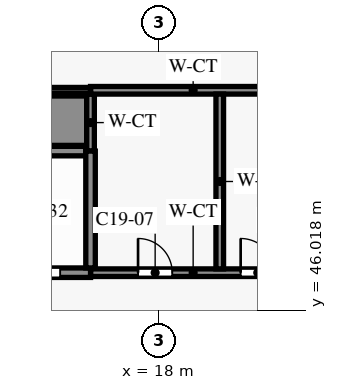
"""IFC4 building model, lengths in metres.
Left out: names, types, materials, properties, quantities, classifications, styles, units other than length and angle.
Written with IfcOpenShell. Run it as: python <this file> out.ifc"""

import sys

from ifc_helpers import new_model, si_unit, direction, frame, frame_2d, origin, place, context, subcontext, project, spatial, rectangle, extrude, element, fill, save


model = new_model("IFC4")
c1 = context("Model", 3, precision=1e-05, world=origin(), true_north=direction((0.0, 1.0)))
c2 = subcontext(c1, "Body", "Model", "MODEL_VIEW")
j1 = project(units=[si_unit("LENGTHUNIT", "METRE"), si_unit("PLANEANGLEUNIT", "RADIAN")], contexts=[c1])
p1 = place(None, origin())
s1 = spatial("IfcSite", under=j1, at=p1, CompositionType="ELEMENT")
p2 = place(p1, origin())
s2 = spatial("IfcBuilding", under=s1, at=p2, CompositionType="ELEMENT")
p3 = place(p2, frame((0.0, 0.0, 137.9)))
s3 = spatial("IfcBuildingStorey", under=s2, at=p3, CompositionType="ELEMENT", Elevation=137.9)
p4 = place(p3, frame((16.2, 47.0, 0.0), z_axis=(0.0, 0.0, 1.0), x_axis=(1.0, 0.0, 0.0)))
e1 = element("IfcWall", 1, at=p4, inside=s3, PredefinedType="PARTITIONING", context=c2, shape_type="SweptSolid", body=[
    extrude(rectangle(XDim=5.4, YDim=0.2, at=frame_2d((2.7, 0.0))), origin(), (0.0, 0.0, 1.0), 5.2),
])
p5 = place(p4, frame((1.25, 0.0, 0.0)))
e2 = element("IfcOpeningElement", 2, at=p5, cuts=e1, PredefinedType="OPENING", context=c2, shape_type="SweptSolid", body=[
    extrude(rectangle(XDim=0.9, YDim=2.1, at=frame_2d((0.45, 1.05))), frame((0.0, 0.11, 0.0), z_axis=(0.0, -1.0, 0.0), x_axis=(1.0, 0.0, 0.0)), (0.0, 0.0, 1.0), 0.22),
])
p6 = place(p4, frame((3.95, 0.0, 0.0)))
e3 = element("IfcOpeningElement", 3, at=p6, cuts=e1, PredefinedType="OPENING", context=c2, shape_type="SweptSolid", body=[
    extrude(rectangle(XDim=0.9, YDim=2.1, at=frame_2d((0.45, 1.05))), frame((0.0, 0.11, 0.0), z_axis=(0.0, -1.0, 0.0), x_axis=(1.0, 0.0, 0.0)), (0.0, 0.0, 1.0), 0.22),
])
p7 = place(p3, frame((0.125, 47.0, 0.0), z_axis=(0.0, 0.0, 1.0), x_axis=(1.0, 0.0, 0.0)))
e4 = element("IfcWall", 4, at=p7, inside=s3, PredefinedType="SHEAR", context=c2, shape_type="SweptSolid", body=[
    extrude(rectangle(XDim=16.075, YDim=0.25, at=frame_2d((8.038, 0.0))), origin(), (0.0, 0.0, 1.0), 5.2),
])
p8 = place(p7, frame((0.675, 0.0, 0.0)))
e5 = element("IfcOpeningElement", 5, at=p8, cuts=e4, PredefinedType="OPENING", context=c2, shape_type="SweptSolid", body=[
    extrude(rectangle(XDim=1.1, YDim=2.1, at=frame_2d((0.55, 1.05))), frame((0.0, 0.135, 0.0), z_axis=(0.0, -1.0, 0.0), x_axis=(1.0, 0.0, 0.0)), (0.0, 0.0, 1.0), 0.27),
])
p9 = place(p7, frame((3.375, 0.0, 0.0)))
e6 = element("IfcOpeningElement", 6, at=p9, cuts=e4, PredefinedType="OPENING", context=c2, shape_type="SweptSolid", body=[
    extrude(rectangle(XDim=1.1, YDim=2.1, at=frame_2d((0.55, 1.05))), frame((0.0, 0.135, 0.0), z_axis=(0.0, -1.0, 0.0), x_axis=(1.0, 0.0, 0.0)), (0.0, 0.0, 1.0), 0.27),
])
p10 = place(p7, frame((6.075, 0.0, 0.0)))
e7 = element("IfcOpeningElement", 7, at=p10, cuts=e4, PredefinedType="OPENING", context=c2, shape_type="SweptSolid", body=[
    extrude(rectangle(XDim=1.1, YDim=2.1, at=frame_2d((0.55, 1.05))), frame((0.0, 0.135, 0.0), z_axis=(0.0, -1.0, 0.0), x_axis=(1.0, 0.0, 0.0)), (0.0, 0.0, 1.0), 0.27),
])
p11 = place(p7, frame((8.775, 0.0, 0.0)))
e8 = element("IfcOpeningElement", 8, at=p11, cuts=e4, PredefinedType="OPENING", context=c2, shape_type="SweptSolid", body=[
    extrude(rectangle(XDim=1.1, YDim=2.1, at=frame_2d((0.55, 1.05))), frame((0.0, 0.135, 0.0), z_axis=(0.0, -1.0, 0.0), x_axis=(1.0, 0.0, 0.0)), (0.0, 0.0, 1.0), 0.27),
])
p12 = place(p7, frame((11.475, 0.0, 0.0)))
e9 = element("IfcOpeningElement", 9, at=p12, cuts=e4, PredefinedType="OPENING", context=c2, shape_type="SweptSolid", body=[
    extrude(rectangle(XDim=1.1, YDim=2.1, at=frame_2d((0.55, 1.05))), frame((0.0, 0.135, 0.0), z_axis=(0.0, -1.0, 0.0), x_axis=(1.0, 0.0, 0.0)), (0.0, 0.0, 1.0), 0.27),
])
p13 = place(p7, frame((14.175, 0.0, 0.0)))
e10 = element("IfcOpeningElement", 10, at=p13, cuts=e4, PredefinedType="OPENING", context=c2, shape_type="SweptSolid", body=[
    extrude(rectangle(XDim=1.1, YDim=2.1, at=frame_2d((0.55, 1.05))), frame((0.0, 0.135, 0.0), z_axis=(0.0, -1.0, 0.0), x_axis=(1.0, 0.0, 0.0)), (0.0, 0.0, 1.0), 0.27),
])
p14 = place(p3, frame((0.125, 50.2, 0.0), z_axis=(0.0, 0.0, 1.0), x_axis=(1.0, 0.0, 0.0)))
e11 = element("IfcWall", 11, at=p14, inside=s3, PredefinedType="SHEAR", context=c2, shape_type="SweptSolid", body=[
    extrude(rectangle(XDim=15.95, YDim=0.25, at=frame_2d((7.975, 0.0))), origin(), (0.0, 0.0, 1.0), 5.2),
])
p15 = place(p3, frame((-0.125, 51.0, 0.0), z_axis=(0.0, 0.0, 1.0), x_axis=(1.0, 0.0, 0.0)))
e12 = element("IfcWall", 12, at=p15, inside=s3, PredefinedType="SHEAR", context=c2, shape_type="SweptSolid", body=[
    extrude(rectangle(XDim=16.225, YDim=1.3, at=frame_2d((8.113, 0.0))), origin(), (0.0, 0.0, 1.0), 5.2),
])
p16 = place(p3, frame((8.1, 51.8, 0.0), z_axis=(0.0, 0.0, 1.0), x_axis=(1.0, 0.0, 0.0)))
e13 = element("IfcWall", 13, at=p16, inside=s3, PredefinedType="PARTITIONING", context=c2, shape_type="SweptSolid", body=[
    extrude(rectangle(XDim=8.1, YDim=0.15, at=frame_2d((4.05, 0.0))), origin(), (0.0, 0.0, 1.0), 5.2),
])
p17 = place(p3, frame((16.2, 51.8, 0.0), z_axis=(0.0, 0.0, 1.0), x_axis=(1.0, 0.0, 0.0)))
e14 = element("IfcWall", 14, at=p17, inside=s3, PredefinedType="PARTITIONING", context=c2, shape_type="SweptSolid", body=[
    extrude(rectangle(XDim=5.4, YDim=0.2, at=frame_2d((2.7, 0.0))), origin(), (0.0, 0.0, 1.0), 5.2),
])
p18 = place(p3, frame((16.2, 50.2, 0.0), z_axis=(0.0, 0.0, 1.0), x_axis=(0.0, 1.0, 0.0)))
e15 = element("IfcWall", 15, at=p18, inside=s3, PredefinedType="PARTITIONING", context=c2, shape_type="SweptSolid", body=[
    extrude(rectangle(XDim=1.5, YDim=0.2, at=frame_2d((0.75, 0.0))), origin(), (0.0, 0.0, 1.0), 5.2),
])
p19 = place(p3, frame((16.2, 47.125, 0.0), z_axis=(0.0, 0.0, 1.0), x_axis=(0.0, 1.0, 0.0)))
e16 = element("IfcWall", 16, at=p19, inside=s3, PredefinedType="SHEAR", context=c2, shape_type="SweptSolid", body=[
    extrude(rectangle(XDim=3.075, YDim=0.25, at=frame_2d((1.538, 0.0))), origin(), (0.0, 0.0, 1.0), 5.2),
])
p20 = place(p3, frame((19.6, 47.1, 0.0), z_axis=(0.0, 0.0, 1.0), x_axis=(0.0, 1.0, 0.0)))
e17 = element("IfcWall", 17, at=p20, inside=s3, PredefinedType="PARTITIONING", context=c2, shape_type="SweptSolid", body=[
    extrude(rectangle(XDim=4.6, YDim=0.2, at=frame_2d((2.3, 0.0))), origin(), (0.0, 0.0, 1.0), 5.2),
])
p21 = place(p5, origin())
e18 = element("IfcDoor", 18, at=p21, inside=s3, OperationType="SINGLE_SWING_LEFT", PredefinedType="DOOR", context=c2, shape_type="SweptSolid", body=[
    extrude(rectangle(XDim=0.9, YDim=2.1, at=frame_2d((0.45, 1.05))), frame((0.0, 0.025, 0.0), z_axis=(0.0, -1.0, 0.0), x_axis=(1.0, 0.0, 0.0)), (0.0, 0.0, 1.0), 0.05),
])
fill(e2, e18)
p22 = place(p6, origin())
e19 = element("IfcDoor", 19, at=p22, inside=s3, OperationType="SINGLE_SWING_RIGHT", PredefinedType="DOOR", context=c2, shape_type="SweptSolid", body=[
    extrude(rectangle(XDim=0.9, YDim=2.1, at=frame_2d((0.45, 1.05))), frame((0.0, 0.025, 0.0), z_axis=(0.0, -1.0, 0.0), x_axis=(1.0, 0.0, 0.0)), (0.0, 0.0, 1.0), 0.05),
])
fill(e3, e19)
p23 = place(p13, origin())
e20 = element("IfcDoor", 20, at=p23, inside=s3, OperationType="DOUBLE_DOOR_SLIDING", PredefinedType="DOOR", context=c2, shape_type="SweptSolid", body=[
    extrude(rectangle(XDim=1.1, YDim=2.1, at=frame_2d((0.55, 1.05))), frame((0.0, 0.025, 0.0), z_axis=(0.0, -1.0, 0.0), x_axis=(1.0, 0.0, 0.0)), (0.0, 0.0, 1.0), 0.05),
])
fill(e10, e20)
save(model, sys.argv[1])
